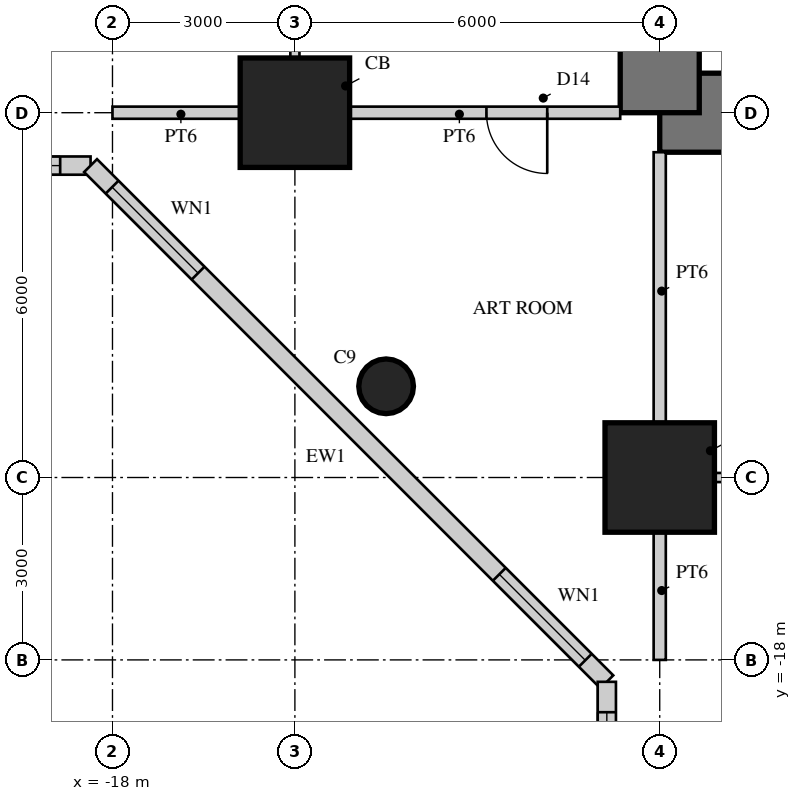
"""IFC4 building model, lengths in metres.
Left out: names, types, materials, properties, quantities, classifications, styles, units other than length and angle.
Written with IfcOpenShell. Run it as: python <this file> out.ifc"""

import sys

from ifc_helpers import new_model, si_unit, direction, frame, frame_2d, origin, origin_2d, place, context, subcontext, project, spatial, rectangle, hollow_rectangle, circle, extrude, element, fill, save


model = new_model("IFC4")
c1 = context("Model", 3, precision=1e-05, world=origin(), true_north=direction((0.0, 1.0)))
c2 = subcontext(c1, "Body", "Model", "MODEL_VIEW")
j1 = project(units=[si_unit("LENGTHUNIT", "METRE"), si_unit("PLANEANGLEUNIT", "RADIAN")], contexts=[c1])
p1 = place(None, origin())
s1 = spatial("IfcSite", under=j1, at=p1, CompositionType="ELEMENT")
p2 = place(p1, origin())
s2 = spatial("IfcBuilding", under=s1, at=p2, CompositionType="ELEMENT")
p3 = place(p2, frame((0.0, 0.0, 5.0)))
s3 = spatial("IfcBuildingStorey", under=s2, at=p3, CompositionType="ELEMENT", Elevation=5.0)
p4 = place(p3, frame((-9.0, -9.0, 0.0), z_axis=(0.0, 0.0, 1.0), x_axis=(1.0, 0.0, 0.0)))
e1 = element("IfcWall", 1, at=p4, inside=s3, PredefinedType="SHEAR", context=c2, shape_type="SweptSolid", body=[
    extrude(rectangle(XDim=18.0, YDim=1.3, at=frame_2d((9.0, 0.0))), origin(), (0.0, 0.0, 1.0), 4.5),
])
p5 = place(p4, frame((9.8, 0.0, 0.0)))
e2 = element("IfcOpeningElement", 2, at=p5, cuts=e1, PredefinedType="OPENING", context=c2, shape_type="SweptSolid", body=[
    extrude(rectangle(XDim=1.0, YDim=2.4, at=frame_2d((0.5, 1.2))), frame((0.0, 0.66, 0.0), z_axis=(0.0, -1.0, 0.0), x_axis=(1.0, 0.0, 0.0)), (0.0, 0.0, 1.0), 1.32),
])
p6 = place(p3, frame((-9.0, 9.0, 0.0), z_axis=(0.0, 0.0, 1.0), x_axis=(0.0, -1.0, 0.0)))
e3 = element("IfcWall", 3, at=p6, inside=s3, PredefinedType="SHEAR", context=c2, shape_type="SweptSolid", body=[
    extrude(rectangle(XDim=18.0, YDim=1.3, at=frame_2d((9.0, 0.0))), origin(), (0.0, 0.0, 1.0), 4.5),
])
p7 = place(p6, frame((9.8, 0.0, 0.0)))
e4 = element("IfcOpeningElement", 4, at=p7, cuts=e3, PredefinedType="OPENING", context=c2, shape_type="SweptSolid", body=[
    extrude(rectangle(XDim=1.0, YDim=2.4, at=frame_2d((0.5, 1.2))), frame((0.0, 0.66, 0.0), z_axis=(0.0, -1.0, 0.0), x_axis=(1.0, 0.0, 0.0)), (0.0, 0.0, 1.0), 1.32),
])
for number, where, z_axis, x_axis in (
    (5, (-9.0, -15.0, 0.0), (0.0, 0.0, 1.0), (1.0, 0.0, 0.0)),
    (6, (-15.0, -9.0, 0.0), (0.0, 0.0, 1.0), (1.0, 0.0, 0.0)),
):
    element("IfcColumn", number, at=place(p3, frame(where, z_axis=z_axis, x_axis=x_axis)), inside=s3, PredefinedType="COLUMN", context=c2, shape_type="SweptSolid", body=[
        extrude(rectangle(XDim=1.8, YDim=1.8, at=origin_2d()), origin(), (0.0, 0.0, 1.0), 4.5),
    ])
p8 = place(p3, frame((-13.5, -13.5, 0.0), z_axis=(0.0, 0.0, 1.0), x_axis=(1.0, 0.0, 0.0)))
e7 = element("IfcColumn", 7, at=p8, inside=s3, PredefinedType="COLUMN", context=c2, shape_type="SweptSolid", body=[
    extrude(circle(Radius=0.45, at=origin_2d()), origin(), (0.0, 0.0, 1.0), 4.5),
])
p9 = place(p3, frame((-24.36, -9.87, 0.0), z_axis=(0.0, 0.0, 1.0), x_axis=(1.0, 0.0, 0.0)))
e8 = element("IfcWall", 8, at=p9, inside=s3, PredefinedType="SOLIDWALL", context=c2, shape_type="SweptSolid", body=[
    extrude(rectangle(XDim=6.0, YDim=0.3, at=frame_2d((3.0, 0.0))), origin(), (0.0, 0.0, 1.0), 4.3),
])
p10 = place(p9, frame((3.5, 0.0, 0.9)))
e9 = element("IfcOpeningElement", 9, at=p10, cuts=e8, PredefinedType="OPENING", context=c2, shape_type="SweptSolid", body=[
    extrude(rectangle(XDim=2.0, YDim=1.8, at=frame_2d((1.0, 0.9))), frame((0.0, 0.16, 0.0), z_axis=(0.0, -1.0, 0.0), x_axis=(1.0, 0.0, 0.0)), (0.0, 0.0, 1.0), 0.32),
])
p11 = place(p3, frame((-18.36, -9.87, 0.0), z_axis=(0.0, 0.0, 1.0), x_axis=(0.707106781187, -0.707106781187, 0.0)))
e10 = element("IfcWall", 10, at=p11, inside=s3, PredefinedType="SOLIDWALL", context=c2, shape_type="SweptSolid", body=[
    extrude(rectangle(XDim=12.007, YDim=0.3, at=frame_2d((6.003, 0.0))), origin(), (0.0, 0.0, 1.0), 4.3),
])
p12 = place(p11, frame((0.501, 0.0, 0.9)))
e11 = element("IfcOpeningElement", 11, at=p12, cuts=e10, PredefinedType="OPENING", context=c2, shape_type="SweptSolid", body=[
    extrude(rectangle(XDim=2.0, YDim=1.8, at=frame_2d((1.0, 0.9))), frame((0.0, 0.16, 0.0), z_axis=(0.0, -1.0, 0.0), x_axis=(1.0, 0.0, 0.0)), (0.0, 0.0, 1.0), 0.32),
])
p13 = place(p11, frame((9.506, 0.0, 0.9)))
e12 = element("IfcOpeningElement", 12, at=p13, cuts=e10, PredefinedType="OPENING", context=c2, shape_type="SweptSolid", body=[
    extrude(rectangle(XDim=2.0, YDim=1.8, at=frame_2d((1.0, 0.9))), frame((0.0, 0.16, 0.0), z_axis=(0.0, -1.0, 0.0), x_axis=(1.0, 0.0, 0.0)), (0.0, 0.0, 1.0), 0.32),
])
p14 = place(p3, frame((-9.87, -18.36, 0.0), z_axis=(0.0, 0.0, 1.0), x_axis=(0.0, -1.0, 0.0)))
e13 = element("IfcWall", 13, at=p14, inside=s3, PredefinedType="SOLIDWALL", context=c2, shape_type="SweptSolid", body=[
    extrude(rectangle(XDim=6.0, YDim=0.3, at=frame_2d((3.0, 0.0))), origin(), (0.0, 0.0, 1.0), 4.3),
])
p15 = place(p14, frame((0.5, 0.0, 0.9)))
e14 = element("IfcOpeningElement", 14, at=p15, cuts=e13, PredefinedType="OPENING", context=c2, shape_type="SweptSolid", body=[
    extrude(rectangle(XDim=2.0, YDim=1.8, at=frame_2d((1.0, 0.9))), frame((0.0, 0.16, 0.0), z_axis=(0.0, -1.0, 0.0), x_axis=(1.0, 0.0, 0.0)), (0.0, 0.0, 1.0), 0.32),
])
p16 = place(p3, frame((-8.25, -15.0, 0.0), z_axis=(0.0, 0.0, 1.0), x_axis=(1.0, 0.0, 0.0)))
e15 = element("IfcWall", 15, at=p16, inside=s3, PredefinedType="PARTITIONING", context=c2, shape_type="SweptSolid", body=[
    extrude(rectangle(XDim=7.45, YDim=0.15, at=frame_2d((3.725, 0.0))), origin(), (0.0, 0.0, 1.0), 3.35),
])
p17 = place(p3, frame((-15.0, -2.575, 0.0), z_axis=(0.0, 0.0, 1.0), x_axis=(0.0, -1.0, 0.0)))
e16 = element("IfcWall", 16, at=p17, inside=s3, PredefinedType="PARTITIONING", context=c2, shape_type="SweptSolid", body=[
    extrude(rectangle(XDim=5.675, YDim=0.15, at=frame_2d((2.837, 0.0))), origin(), (0.0, 0.0, 1.0), 3.35),
])
p18 = place(p3, frame((-9.65, -9.0, 0.0), z_axis=(0.0, 0.0, 1.0), x_axis=(-1.0, 0.0, 0.0)))
e17 = element("IfcWall", 17, at=p18, inside=s3, PredefinedType="SOLIDWALL", context=c2, shape_type="SweptSolid", body=[
    extrude(rectangle(XDim=4.6, YDim=0.2, at=frame_2d((2.3, 0.0))), origin(), (0.0, 0.0, 1.0), 3.3),
])
p19 = place(p18, frame((1.2, 0.0, 0.0)))
e18 = element("IfcOpeningElement", 18, at=p19, cuts=e17, PredefinedType="OPENING", context=c2, shape_type="SweptSolid", body=[
    extrude(rectangle(XDim=1.0, YDim=2.2, at=frame_2d((0.5, 1.1))), frame((0.0, 0.11, 0.0), z_axis=(0.0, -1.0, 0.0), x_axis=(1.0, 0.0, 0.0)), (0.0, 0.0, 1.0), 0.22),
])
p20 = place(p3, frame((-15.75, -9.0, 0.0), z_axis=(0.0, 0.0, 1.0), x_axis=(-1.0, 0.0, 0.0)))
e19 = element("IfcWall", 19, at=p20, inside=s3, PredefinedType="SOLIDWALL", context=c2, shape_type="SweptSolid", body=[
    extrude(rectangle(XDim=2.25, YDim=0.2, at=frame_2d((1.125, 0.0))), origin(), (0.0, 0.0, 1.0), 3.3),
])
p21 = place(p3, frame((-9.0, -14.25, 0.0), z_axis=(0.0, 0.0, 1.0), x_axis=(0.0, 1.0, 0.0)))
e20 = element("IfcWall", 20, at=p21, inside=s3, PredefinedType="SOLIDWALL", context=c2, shape_type="SweptSolid", body=[
    extrude(rectangle(XDim=4.6, YDim=0.2, at=frame_2d((2.3, 0.0))), origin(), (0.0, 0.0, 1.0), 3.3),
])
p22 = place(p3, frame((-9.0, -18.0, 0.0), z_axis=(0.0, 0.0, 1.0), x_axis=(0.0, 1.0, 0.0)))
e21 = element("IfcWall", 21, at=p22, inside=s3, PredefinedType="SOLIDWALL", context=c2, shape_type="SweptSolid", body=[
    extrude(rectangle(XDim=2.25, YDim=0.2, at=frame_2d((1.125, 0.0))), origin(), (0.0, 0.0, 1.0), 3.3),
])
p23 = place(p10, origin())
e22 = element("IfcWindow", 22, at=p23, inside=s3, PartitioningType="SINGLE_PANEL", PredefinedType="WINDOW", context=c2, shape_type="SweptSolid", body=[
    extrude(hollow_rectangle(XDim=2.0, YDim=1.8, WallThickness=0.06, at=frame_2d((1.0, 0.9))), frame((0.0, 0.03, 0.0), z_axis=(0.0, -1.0, 0.0), x_axis=(1.0, 0.0, 0.0)), (0.0, 0.0, 1.0), 0.06),
    extrude(rectangle(XDim=1.879, YDim=1.679, at=frame_2d((1.0, 0.9))), frame((0.0, 0.03, 0.0), z_axis=(0.0, -1.0, 0.0), x_axis=(1.0, 0.0, 0.0)), (0.0, 0.0, 1.0), 0.06),
])
fill(e9, e22)
p24 = place(p12, origin())
e23 = element("IfcWindow", 23, at=p24, inside=s3, PartitioningType="SINGLE_PANEL", PredefinedType="WINDOW", context=c2, shape_type="SweptSolid", body=[
    extrude(hollow_rectangle(XDim=2.0, YDim=1.8, WallThickness=0.06, at=frame_2d((1.0, 0.9))), frame((0.0, 0.03, 0.0), z_axis=(0.0, -1.0, 0.0), x_axis=(1.0, 0.0, 0.0)), (0.0, 0.0, 1.0), 0.06),
    extrude(rectangle(XDim=1.879, YDim=1.679, at=frame_2d((1.0, 0.9))), frame((0.0, 0.03, 0.0), z_axis=(0.0, -1.0, 0.0), x_axis=(1.0, 0.0, 0.0)), (0.0, 0.0, 1.0), 0.06),
])
fill(e11, e23)
p25 = place(p13, origin())
e24 = element("IfcWindow", 24, at=p25, inside=s3, PartitioningType="SINGLE_PANEL", PredefinedType="WINDOW", context=c2, shape_type="SweptSolid", body=[
    extrude(hollow_rectangle(XDim=2.0, YDim=1.8, WallThickness=0.06, at=frame_2d((1.0, 0.9))), frame((0.0, 0.03, 0.0), z_axis=(0.0, -1.0, 0.0), x_axis=(1.0, 0.0, 0.0)), (0.0, 0.0, 1.0), 0.06),
    extrude(rectangle(XDim=1.879, YDim=1.679, at=frame_2d((1.0, 0.9))), frame((0.0, 0.03, 0.0), z_axis=(0.0, -1.0, 0.0), x_axis=(1.0, 0.0, 0.0)), (0.0, 0.0, 1.0), 0.06),
])
fill(e12, e24)
p26 = place(p15, origin())
e25 = element("IfcWindow", 25, at=p26, inside=s3, PartitioningType="SINGLE_PANEL", PredefinedType="WINDOW", context=c2, shape_type="SweptSolid", body=[
    extrude(hollow_rectangle(XDim=2.0, YDim=1.8, WallThickness=0.06, at=frame_2d((1.0, 0.9))), frame((0.0, 0.03, 0.0), z_axis=(0.0, -1.0, 0.0), x_axis=(1.0, 0.0, 0.0)), (0.0, 0.0, 1.0), 0.06),
    extrude(rectangle(XDim=1.879, YDim=1.679, at=frame_2d((1.0, 0.9))), frame((0.0, 0.03, 0.0), z_axis=(0.0, -1.0, 0.0), x_axis=(1.0, 0.0, 0.0)), (0.0, 0.0, 1.0), 0.06),
])
fill(e14, e25)
p27 = place(p19, origin())
e26 = element("IfcDoor", 26, at=p27, inside=s3, OperationType="SINGLE_SWING_LEFT", PredefinedType="DOOR", context=c2, shape_type="SweptSolid", body=[
    extrude(rectangle(XDim=1.0, YDim=2.2, at=frame_2d((0.5, 1.1))), frame((0.0, 0.025, 0.0), z_axis=(0.0, -1.0, 0.0), x_axis=(1.0, 0.0, 0.0)), (0.0, 0.0, 1.0), 0.05),
])
fill(e18, e26)
save(model, sys.argv[1])
